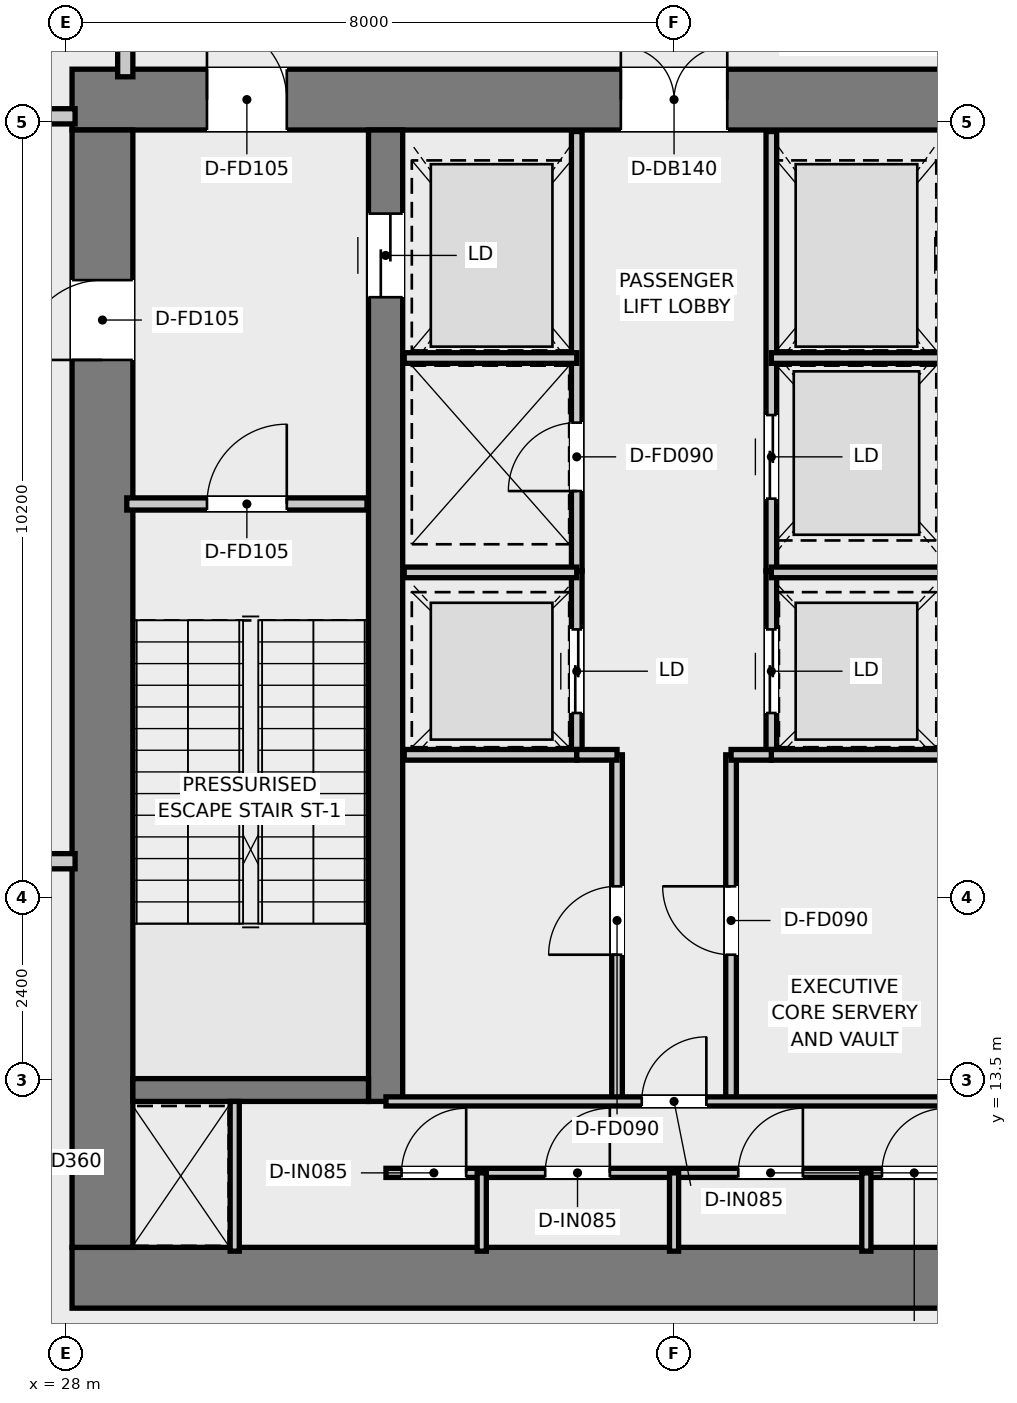
"""IFC4 building model, lengths in metres.
Left out: names, types, materials, properties, quantities, classifications, styles, units other than length and angle.
Written with IfcOpenShell. Run it as: python <this file> out.ifc"""

import sys

from ifc_helpers import new_model, si_unit, direction, frame, frame_2d, origin, place, context, subcontext, project, spatial, rectangle, extrude, element, fill, save


model = new_model("IFC4")
c1 = context("Model", 3, precision=1e-05, world=origin(), true_north=direction((0.0, 1.0)))
c2 = subcontext(c1, "Body", "Model", "MODEL_VIEW")
j1 = project(units=[si_unit("LENGTHUNIT", "METRE"), si_unit("PLANEANGLEUNIT", "RADIAN")], contexts=[c1])
p1 = place(None, origin())
s1 = spatial("IfcSite", under=j1, at=p1, CompositionType="ELEMENT")
p2 = place(p1, origin())
s2 = spatial("IfcBuilding", under=s1, at=p2, CompositionType="ELEMENT")
p3 = place(p2, frame((0.0, 0.0, 318.75)))
s3 = spatial("IfcBuildingStorey", under=s2, at=p3, CompositionType="ELEMENT", Elevation=318.75)
p4 = place(p3, frame((28.08, 10.9, 0.0), z_axis=(0.0, 0.0, 1.0), x_axis=(1.0, 0.0, 0.0)))
e1 = element("IfcWall", 1, at=p4, inside=s3, PredefinedType="SHEAR", context=c2, shape_type="SweptSolid", body=[
    extrude(rectangle(XDim=15.84, YDim=0.8, at=frame_2d((7.92, 0.0))), origin(), (0.0, 0.0, 1.0), 5.0),
])
p5 = place(p3, frame((28.08, 26.4, 0.0), z_axis=(0.0, 0.0, 1.0), x_axis=(1.0, 0.0, 0.0)))
e2 = element("IfcWall", 2, at=p5, inside=s3, PredefinedType="SHEAR", context=c2, shape_type="SweptSolid", body=[
    extrude(rectangle(XDim=15.84, YDim=0.8, at=frame_2d((7.92, 0.0))), origin(), (0.0, 0.0, 1.0), 5.0),
])
p6 = place(p5, frame((7.22, 0.0, 0.0)))
e3 = element("IfcOpeningElement", 3, at=p6, cuts=e2, PredefinedType="OPENING", context=c2, shape_type="SweptSolid", body=[
    extrude(rectangle(XDim=1.4, YDim=2.2, at=frame_2d((0.7, 1.1))), frame((0.0, 0.41, 0.0), z_axis=(0.0, -1.0, 0.0), x_axis=(1.0, 0.0, 0.0)), (0.0, 0.0, 1.0), 0.82),
])
p7 = place(p5, frame((1.775, 0.0, 0.0)))
e4 = element("IfcOpeningElement", 4, at=p7, cuts=e2, PredefinedType="OPENING", context=c2, shape_type="SweptSolid", body=[
    extrude(rectangle(XDim=1.05, YDim=2.1, at=frame_2d((0.525, 1.05))), frame((0.0, 0.41, 0.0), z_axis=(0.0, -1.0, 0.0), x_axis=(1.0, 0.0, 0.0)), (0.0, 0.0, 1.0), 0.82),
])
p8 = place(p5, frame((13.015, 0.0, 0.0)))
e5 = element("IfcOpeningElement", 5, at=p8, cuts=e2, PredefinedType="OPENING", context=c2, shape_type="SweptSolid", body=[
    extrude(rectangle(XDim=1.05, YDim=2.1, at=frame_2d((0.525, 1.05))), frame((0.0, 0.41, 0.0), z_axis=(0.0, -1.0, 0.0), x_axis=(1.0, 0.0, 0.0)), (0.0, 0.0, 1.0), 0.82),
])
p9 = place(p3, frame((28.48, 11.3, 0.0), z_axis=(0.0, 0.0, 1.0), x_axis=(0.0, 1.0, 0.0)))
e6 = element("IfcWall", 6, at=p9, inside=s3, PredefinedType="SHEAR", context=c2, shape_type="SweptSolid", body=[
    extrude(rectangle(XDim=14.7, YDim=0.8, at=frame_2d((7.35, 0.0))), origin(), (0.0, 0.0, 1.0), 5.0),
])
p10 = place(p9, frame((11.675, 0.0, 0.0)))
e7 = element("IfcOpeningElement", 7, at=p10, cuts=e6, PredefinedType="OPENING", context=c2, shape_type="SweptSolid", body=[
    extrude(rectangle(XDim=1.05, YDim=2.1, at=frame_2d((0.525, 1.05))), frame((0.0, 0.41, 0.0), z_axis=(0.0, -1.0, 0.0), x_axis=(1.0, 0.0, 0.0)), (0.0, 0.0, 1.0), 0.82),
])
p11 = place(p3, frame((32.205, 13.22, 0.0), z_axis=(0.0, 0.0, 1.0), x_axis=(0.0, 1.0, 0.0)))
e8 = element("IfcWall", 8, at=p11, inside=s3, PredefinedType="SHEAR", context=c2, shape_type="SweptSolid", body=[
    extrude(rectangle(XDim=12.78, YDim=0.45, at=frame_2d((6.39, 0.0))), origin(), (0.0, 0.0, 1.0), 5.0),
])
p12 = place(p11, frame((10.58, 0.0, 0.0)))
e9 = element("IfcOpeningElement", 9, at=p12, cuts=e8, PredefinedType="OPENING", context=c2, shape_type="SweptSolid", body=[
    extrude(rectangle(XDim=1.1, YDim=2.15, at=frame_2d((0.55, 1.075))), frame((0.0, 0.235, 0.0), z_axis=(0.0, -1.0, 0.0), x_axis=(1.0, 0.0, 0.0)), (0.0, 0.0, 1.0), 0.47),
])
p13 = place(p3, frame((28.88, 13.37, 0.0), z_axis=(0.0, 0.0, 1.0), x_axis=(1.0, 0.0, 0.0)))
e10 = element("IfcWall", 10, at=p13, inside=s3, PredefinedType="SHEAR", context=c2, shape_type="SweptSolid", body=[
    extrude(rectangle(XDim=3.1, YDim=0.3, at=frame_2d((1.55, 0.0))), origin(), (0.0, 0.0, 1.0), 5.0),
])
p14 = place(p3, frame((28.8, 21.08, 0.0), z_axis=(0.0, 0.0, 1.0), x_axis=(1.0, 0.0, 0.0)))
e11 = element("IfcWall", 11, at=p14, inside=s3, PredefinedType="PARTITIONING", context=c2, shape_type="SweptSolid", body=[
    extrude(rectangle(XDim=3.16, YDim=0.16, at=frame_2d((1.58, 0.0))), origin(), (0.0, 0.0, 1.0), 4.72),
])
p15 = place(p14, frame((1.055, 0.0, 0.0)))
e12 = element("IfcOpeningElement", 12, at=p15, cuts=e11, PredefinedType="OPENING", context=c2, shape_type="SweptSolid", body=[
    extrude(rectangle(XDim=1.05, YDim=2.1, at=frame_2d((0.525, 1.05))), frame((0.0, 0.09, 0.0), z_axis=(0.0, -1.0, 0.0), x_axis=(1.0, 0.0, 0.0)), (0.0, 0.0, 1.0), 0.18),
])
p16 = place(p3, frame((34.72, 20.2, 0.0), z_axis=(0.0, 0.0, 1.0), x_axis=(0.0, 1.0, 0.0)))
e13 = element("IfcWall", 13, at=p16, inside=s3, PredefinedType="PARTITIONING", context=c2, shape_type="SweptSolid", body=[
    extrude(rectangle(XDim=5.78, YDim=0.14, at=frame_2d((2.89, 0.0))), origin(), (0.0, 0.0, 1.0), 3.87),
])
p17 = place(p16, frame((1.05, 0.0, 0.0)))
e14 = element("IfcOpeningElement", 14, at=p17, cuts=e13, PredefinedType="OPENING", context=c2, shape_type="SweptSolid", body=[
    extrude(rectangle(XDim=0.9, YDim=2.1, at=frame_2d((0.45, 1.05))), frame((0.0, 0.08, 0.0), z_axis=(0.0, -1.0, 0.0), x_axis=(1.0, 0.0, 0.0)), (0.0, 0.0, 1.0), 0.16),
])
p18 = place(p3, frame((37.28, 20.2, 0.0), z_axis=(0.0, 0.0, 1.0), x_axis=(0.0, 1.0, 0.0)))
e15 = element("IfcWall", 15, at=p18, inside=s3, PredefinedType="PARTITIONING", context=c2, shape_type="SweptSolid", body=[
    extrude(rectangle(XDim=5.78, YDim=0.14, at=frame_2d((2.89, 0.0))), origin(), (0.0, 0.0, 1.0), 3.87),
])
p19 = place(p18, frame((0.95, 0.0, 0.0)))
e16 = element("IfcOpeningElement", 16, at=p19, cuts=e15, PredefinedType="OPENING", context=c2, shape_type="SweptSolid", body=[
    extrude(rectangle(XDim=1.1, YDim=2.15, at=frame_2d((0.55, 1.075))), frame((0.0, 0.08, 0.0), z_axis=(0.0, -1.0, 0.0), x_axis=(1.0, 0.0, 0.0)), (0.0, 0.0, 1.0), 0.16),
])
for number, where, z_axis, x_axis in (
    (17, (32.45, 23.0, 0.0), (0.0, 0.0, 1.0), (1.0, 0.0, 0.0)),
    (18, (37.28, 23.0, 0.0), (0.0, 0.0, 1.0), (1.0, 0.0, 0.0)),
):
    element("IfcWall", number, at=place(p3, frame(where, z_axis=z_axis, x_axis=x_axis)), inside=s3, PredefinedType="PARTITIONING", context=c2, shape_type="SweptSolid", body=[
        extrude(rectangle(XDim=2.27, YDim=0.14, at=frame_2d((1.135, 0.0))), origin(), (0.0, 0.0, 1.0), 3.87),
    ])
p20 = place(p3, frame((34.72, 17.78, 0.0), z_axis=(0.0, 0.0, 1.0), x_axis=(0.0, 1.0, 0.0)))
e19 = element("IfcWall", 19, at=p20, inside=s3, PredefinedType="PARTITIONING", context=c2, shape_type="SweptSolid", body=[
    extrude(rectangle(XDim=2.42, YDim=0.14, at=frame_2d((1.21, 0.0))), origin(), (0.0, 0.0, 1.0), 4.72),
])
p21 = place(p20, frame((0.55, 0.0, 0.0)))
e20 = element("IfcOpeningElement", 20, at=p21, cuts=e19, PredefinedType="OPENING", context=c2, shape_type="SweptSolid", body=[
    extrude(rectangle(XDim=1.1, YDim=2.15, at=frame_2d((0.55, 1.075))), frame((0.0, 0.08, 0.0), z_axis=(0.0, -1.0, 0.0), x_axis=(1.0, 0.0, 0.0)), (0.0, 0.0, 1.0), 0.16),
])
p22 = place(p3, frame((37.28, 17.78, 0.0), z_axis=(0.0, 0.0, 1.0), x_axis=(0.0, 1.0, 0.0)))
e21 = element("IfcWall", 21, at=p22, inside=s3, PredefinedType="PARTITIONING", context=c2, shape_type="SweptSolid", body=[
    extrude(rectangle(XDim=2.42, YDim=0.14, at=frame_2d((1.21, 0.0))), origin(), (0.0, 0.0, 1.0), 4.72),
])
p23 = place(p22, frame((0.55, 0.0, 0.0)))
e22 = element("IfcOpeningElement", 22, at=p23, cuts=e21, PredefinedType="OPENING", context=c2, shape_type="SweptSolid", body=[
    extrude(rectangle(XDim=1.1, YDim=2.15, at=frame_2d((0.55, 1.075))), frame((0.0, 0.08, 0.0), z_axis=(0.0, -1.0, 0.0), x_axis=(1.0, 0.0, 0.0)), (0.0, 0.0, 1.0), 0.16),
])
for number, where, z_axis, x_axis in (
    (23, (32.45, 17.78, 0.0), (0.0, 0.0, 1.0), (1.0, 0.0, 0.0)),
    (24, (32.45, 20.18, 0.0), (0.0, 0.0, 1.0), (1.0, 0.0, 0.0)),
    (25, (37.28, 17.78, 0.0), (0.0, 0.0, 1.0), (1.0, 0.0, 0.0)),
    (26, (37.28, 20.18, 0.0), (0.0, 0.0, 1.0), (1.0, 0.0, 0.0)),
):
    element("IfcWall", number, at=place(p3, frame(where, z_axis=z_axis, x_axis=x_axis)), inside=s3, PredefinedType="PARTITIONING", context=c2, shape_type="SweptSolid", body=[
        extrude(rectangle(XDim=2.27, YDim=0.14, at=frame_2d((1.135, 0.0))), origin(), (0.0, 0.0, 1.0), 4.72),
    ])
p24 = place(p3, frame((35.25, 13.22, 0.0), z_axis=(0.0, 0.0, 1.0), x_axis=(0.0, 1.0, 0.0)))
e27 = element("IfcWall", 27, at=p24, inside=s3, PredefinedType="PARTITIONING", context=c2, shape_type="SweptSolid", body=[
    extrude(rectangle(XDim=4.56, YDim=0.14, at=frame_2d((2.28, 0.0))), origin(), (0.0, 0.0, 1.0), 4.72),
])
p25 = place(p24, frame((1.93, 0.0, 0.0)))
e28 = element("IfcOpeningElement", 28, at=p25, cuts=e27, PredefinedType="OPENING", context=c2, shape_type="SweptSolid", body=[
    extrude(rectangle(XDim=0.9, YDim=2.1, at=frame_2d((0.45, 1.05))), frame((0.0, 0.08, 0.0), z_axis=(0.0, -1.0, 0.0), x_axis=(1.0, 0.0, 0.0)), (0.0, 0.0, 1.0), 0.16),
])
p26 = place(p3, frame((34.72, 17.78, 0.0), z_axis=(0.0, 0.0, 1.0), x_axis=(1.0, 0.0, 0.0)))
e29 = element("IfcWall", 29, at=p26, inside=s3, PredefinedType="PARTITIONING", context=c2, shape_type="SweptSolid", body=[
    extrude(rectangle(XDim=0.53, YDim=0.14, at=frame_2d((0.265, 0.0))), origin(), (0.0, 0.0, 1.0), 4.72),
])
p27 = place(p3, frame((36.75, 13.22, 0.0), z_axis=(0.0, 0.0, 1.0), x_axis=(0.0, 1.0, 0.0)))
e30 = element("IfcWall", 30, at=p27, inside=s3, PredefinedType="PARTITIONING", context=c2, shape_type="SweptSolid", body=[
    extrude(rectangle(XDim=4.56, YDim=0.14, at=frame_2d((2.28, 0.0))), origin(), (0.0, 0.0, 1.0), 4.72),
])
p28 = place(p27, frame((1.93, 0.0, 0.0)))
e31 = element("IfcOpeningElement", 31, at=p28, cuts=e30, PredefinedType="OPENING", context=c2, shape_type="SweptSolid", body=[
    extrude(rectangle(XDim=0.9, YDim=2.1, at=frame_2d((0.45, 1.05))), frame((0.0, 0.08, 0.0), z_axis=(0.0, -1.0, 0.0), x_axis=(1.0, 0.0, 0.0)), (0.0, 0.0, 1.0), 0.16),
])
p29 = place(p3, frame((36.75, 17.78, 0.0), z_axis=(0.0, 0.0, 1.0), x_axis=(1.0, 0.0, 0.0)))
e32 = element("IfcWall", 32, at=p29, inside=s3, PredefinedType="PARTITIONING", context=c2, shape_type="SweptSolid", body=[
    extrude(rectangle(XDim=0.53, YDim=0.14, at=frame_2d((0.265, 0.0))), origin(), (0.0, 0.0, 1.0), 4.72),
])
p30 = place(p3, frame((30.22, 11.25, 0.0), z_axis=(0.0, 0.0, 1.0), x_axis=(0.0, 1.0, 0.0)))
e33 = element("IfcWall", 33, at=p30, inside=s3, PredefinedType="PARTITIONING", context=c2, shape_type="SweptSolid", body=[
    extrude(rectangle(XDim=1.97, YDim=0.12, at=frame_2d((0.985, 0.0))), origin(), (0.0, 0.0, 1.0), 4.72),
])
p31 = place(p3, frame((32.21, 13.22, 0.0), z_axis=(0.0, 0.0, 1.0), x_axis=(1.0, 0.0, 0.0)))
e34 = element("IfcWall", 34, at=p31, inside=s3, PredefinedType="PARTITIONING", context=c2, shape_type="SweptSolid", body=[
    extrude(rectangle(XDim=7.58, YDim=0.12, at=frame_2d((3.79, 0.0))), origin(), (0.0, 0.0, 1.0), 4.72),
])
p32 = place(p31, frame((3.365, 0.0, 0.0)))
e35 = element("IfcOpeningElement", 35, at=p32, cuts=e34, PredefinedType="OPENING", context=c2, shape_type="SweptSolid", body=[
    extrude(rectangle(XDim=0.85, YDim=2.1, at=frame_2d((0.425, 1.05))), frame((0.0, 0.07, 0.0), z_axis=(0.0, -1.0, 0.0), x_axis=(1.0, 0.0, 0.0)), (0.0, 0.0, 1.0), 0.14),
])
p33 = place(p3, frame((32.21, 12.28, 0.0), z_axis=(0.0, 0.0, 1.0), x_axis=(1.0, 0.0, 0.0)))
e36 = element("IfcWall", 36, at=p33, inside=s3, PredefinedType="PARTITIONING", context=c2, shape_type="SweptSolid", body=[
    extrude(rectangle(XDim=7.58, YDim=0.12, at=frame_2d((3.79, 0.0))), origin(), (0.0, 0.0, 1.0), 4.72),
])
p34 = place(p33, frame((0.205, 0.0, 0.0)))
e37 = element("IfcOpeningElement", 37, at=p34, cuts=e36, PredefinedType="OPENING", context=c2, shape_type="SweptSolid", body=[
    extrude(rectangle(XDim=0.85, YDim=2.1, at=frame_2d((0.425, 1.05))), frame((0.0, 0.07, 0.0), z_axis=(0.0, -1.0, 0.0), x_axis=(1.0, 0.0, 0.0)), (0.0, 0.0, 1.0), 0.14),
])
p35 = place(p33, frame((2.095, 0.0, 0.0)))
e38 = element("IfcOpeningElement", 38, at=p35, cuts=e36, PredefinedType="OPENING", context=c2, shape_type="SweptSolid", body=[
    extrude(rectangle(XDim=0.85, YDim=2.1, at=frame_2d((0.425, 1.05))), frame((0.0, 0.07, 0.0), z_axis=(0.0, -1.0, 0.0), x_axis=(1.0, 0.0, 0.0)), (0.0, 0.0, 1.0), 0.14),
])
p36 = place(p33, frame((4.635, 0.0, 0.0)))
e39 = element("IfcOpeningElement", 39, at=p36, cuts=e36, PredefinedType="OPENING", context=c2, shape_type="SweptSolid", body=[
    extrude(rectangle(XDim=0.85, YDim=2.1, at=frame_2d((0.425, 1.05))), frame((0.0, 0.07, 0.0), z_axis=(0.0, -1.0, 0.0), x_axis=(1.0, 0.0, 0.0)), (0.0, 0.0, 1.0), 0.14),
])
p37 = place(p33, frame((6.525, 0.0, 0.0)))
e40 = element("IfcOpeningElement", 40, at=p37, cuts=e36, PredefinedType="OPENING", context=c2, shape_type="SweptSolid", body=[
    extrude(rectangle(XDim=0.85, YDim=2.1, at=frame_2d((0.425, 1.05))), frame((0.0, 0.07, 0.0), z_axis=(0.0, -1.0, 0.0), x_axis=(1.0, 0.0, 0.0)), (0.0, 0.0, 1.0), 0.14),
])
for number, where, z_axis, x_axis in (
    (41, (33.47, 11.25, 0.0), (0.0, 0.0, 1.0), (0.0, 1.0, 0.0)),
    (42, (36.0, 11.25, 0.0), (0.0, 0.0, 1.0), (0.0, 1.0, 0.0)),
    (43, (38.53, 11.25, 0.0), (0.0, 0.0, 1.0), (0.0, 1.0, 0.0)),
):
    element("IfcWall", number, at=place(p3, frame(where, z_axis=z_axis, x_axis=x_axis)), inside=s3, PredefinedType="PARTITIONING", context=c2, shape_type="SweptSolid", body=[
        extrude(rectangle(XDim=1.03, YDim=0.12, at=frame_2d((0.515, 0.0))), origin(), (0.0, 0.0, 1.0), 4.72),
    ])
p38 = place(p3, frame((28.78, 26.7, 0.0), z_axis=(0.0, 0.0, 1.0), x_axis=(0.0, 1.0, 0.0)))
e44 = element("IfcWall", 44, at=p38, inside=s3, PredefinedType="SOLIDWALL", context=c2, shape_type="SweptSolid", body=[
    extrude(rectangle(XDim=12.6, YDim=0.2, at=frame_2d((6.3, 0.0))), origin(), (0.0, 0.0, 1.0), 4.18),
])
p39 = place(p3, frame((22.05, 16.38, 0.0), z_axis=(0.0, 0.0, 1.0), x_axis=(1.0, 0.0, 0.0)))
e45 = element("IfcWall", 45, at=p39, inside=s3, PredefinedType="SOLIDWALL", context=c2, shape_type="SweptSolid", body=[
    extrude(rectangle(XDim=6.07, YDim=0.2, at=frame_2d((3.035, 0.0))), origin(), (0.0, 0.0, 1.0), 4.18),
])
p40 = place(p3, frame((24.58, 26.18, 0.0), z_axis=(0.0, 0.0, 1.0), x_axis=(1.0, 0.0, 0.0)))
e46 = element("IfcWall", 46, at=p40, inside=s3, PredefinedType="SOLIDWALL", context=c2, shape_type="SweptSolid", body=[
    extrude(rectangle(XDim=3.54, YDim=0.2, at=frame_2d((1.77, 0.0))), origin(), (0.0, 0.0, 1.0), 4.18),
])
p41 = place(p15, origin())
e47 = element("IfcDoor", 47, at=p41, inside=s3, OperationType="SINGLE_SWING_RIGHT", PredefinedType="DOOR", context=c2, shape_type="SweptSolid", body=[
    extrude(rectangle(XDim=1.05, YDim=2.1, at=frame_2d((0.525, 1.05))), frame((0.0, 0.025, 0.0), z_axis=(0.0, -1.0, 0.0), x_axis=(1.0, 0.0, 0.0)), (0.0, 0.0, 1.0), 0.05),
])
fill(e12, e47)
p42 = place(p6, origin())
e48 = element("IfcDoor", 48, at=p42, inside=s3, OperationType="DOUBLE_DOOR_SINGLE_SWING", PredefinedType="DOOR", context=c2, shape_type="SweptSolid", body=[
    extrude(rectangle(XDim=1.4, YDim=2.2, at=frame_2d((0.7, 1.1))), frame((0.0, 0.025, 0.0), z_axis=(0.0, -1.0, 0.0), x_axis=(1.0, 0.0, 0.0)), (0.0, 0.0, 1.0), 0.05),
])
fill(e3, e48)
p43 = place(p7, origin())
e49 = element("IfcDoor", 49, at=p43, inside=s3, OperationType="SINGLE_SWING_LEFT", PredefinedType="DOOR", context=c2, shape_type="SweptSolid", body=[
    extrude(rectangle(XDim=1.05, YDim=2.1, at=frame_2d((0.525, 1.05))), frame((0.0, 0.025, 0.0), z_axis=(0.0, -1.0, 0.0), x_axis=(1.0, 0.0, 0.0)), (0.0, 0.0, 1.0), 0.05),
])
fill(e4, e49)
p44 = place(p10, origin())
e50 = element("IfcDoor", 50, at=p44, inside=s3, OperationType="SINGLE_SWING_LEFT", PredefinedType="DOOR", context=c2, shape_type="SweptSolid", body=[
    extrude(rectangle(XDim=1.05, YDim=2.1, at=frame_2d((0.525, 1.05))), frame((0.0, 0.025, 0.0), z_axis=(0.0, -1.0, 0.0), x_axis=(1.0, 0.0, 0.0)), (0.0, 0.0, 1.0), 0.05),
])
fill(e7, e50)
p45 = place(p12, origin())
e51 = element("IfcDoor", 51, at=p45, inside=s3, OperationType="DOUBLE_DOOR_SLIDING", PredefinedType="DOOR", context=c2, shape_type="SweptSolid", body=[
    extrude(rectangle(XDim=1.1, YDim=2.15, at=frame_2d((0.55, 1.075))), frame((0.0, 0.025, 0.0), z_axis=(0.0, -1.0, 0.0), x_axis=(1.0, 0.0, 0.0)), (0.0, 0.0, 1.0), 0.05),
])
fill(e9, e51)
p46 = place(p17, origin())
e52 = element("IfcDoor", 52, at=p46, inside=s3, OperationType="SINGLE_SWING_LEFT", PredefinedType="DOOR", context=c2, shape_type="SweptSolid", body=[
    extrude(rectangle(XDim=0.9, YDim=2.1, at=frame_2d((0.45, 1.05))), frame((0.0, 0.025, 0.0), z_axis=(0.0, -1.0, 0.0), x_axis=(1.0, 0.0, 0.0)), (0.0, 0.0, 1.0), 0.05),
])
fill(e14, e52)
p47 = place(p19, origin())
e53 = element("IfcDoor", 53, at=p47, inside=s3, OperationType="DOUBLE_DOOR_SLIDING", PredefinedType="DOOR", context=c2, shape_type="SweptSolid", body=[
    extrude(rectangle(XDim=1.1, YDim=2.15, at=frame_2d((0.55, 1.075))), frame((0.0, 0.025, 0.0), z_axis=(0.0, -1.0, 0.0), x_axis=(1.0, 0.0, 0.0)), (0.0, 0.0, 1.0), 0.05),
])
fill(e16, e53)
p48 = place(p21, origin())
e54 = element("IfcDoor", 54, at=p48, inside=s3, OperationType="DOUBLE_DOOR_SLIDING", PredefinedType="DOOR", context=c2, shape_type="SweptSolid", body=[
    extrude(rectangle(XDim=1.1, YDim=2.15, at=frame_2d((0.55, 1.075))), frame((0.0, 0.025, 0.0), z_axis=(0.0, -1.0, 0.0), x_axis=(1.0, 0.0, 0.0)), (0.0, 0.0, 1.0), 0.05),
])
fill(e20, e54)
p49 = place(p23, origin())
e55 = element("IfcDoor", 55, at=p49, inside=s3, OperationType="DOUBLE_DOOR_SLIDING", PredefinedType="DOOR", context=c2, shape_type="SweptSolid", body=[
    extrude(rectangle(XDim=1.1, YDim=2.15, at=frame_2d((0.55, 1.075))), frame((0.0, 0.025, 0.0), z_axis=(0.0, -1.0, 0.0), x_axis=(1.0, 0.0, 0.0)), (0.0, 0.0, 1.0), 0.05),
])
fill(e22, e55)
p50 = place(p25, origin())
e56 = element("IfcDoor", 56, at=p50, inside=s3, OperationType="SINGLE_SWING_LEFT", PredefinedType="DOOR", context=c2, shape_type="SweptSolid", body=[
    extrude(rectangle(XDim=0.9, YDim=2.1, at=frame_2d((0.45, 1.05))), frame((0.0, 0.025, 0.0), z_axis=(0.0, -1.0, 0.0), x_axis=(1.0, 0.0, 0.0)), (0.0, 0.0, 1.0), 0.05),
])
fill(e28, e56)
p51 = place(p28, origin())
e57 = element("IfcDoor", 57, at=p51, inside=s3, OperationType="SINGLE_SWING_RIGHT", PredefinedType="DOOR", context=c2, shape_type="SweptSolid", body=[
    extrude(rectangle(XDim=0.9, YDim=2.1, at=frame_2d((0.45, 1.05))), frame((0.0, 0.025, 0.0), z_axis=(0.0, -1.0, 0.0), x_axis=(1.0, 0.0, 0.0)), (0.0, 0.0, 1.0), 0.05),
])
fill(e31, e57)
p52 = place(p32, origin())
e58 = element("IfcDoor", 58, at=p52, inside=s3, OperationType="SINGLE_SWING_RIGHT", PredefinedType="DOOR", context=c2, shape_type="SweptSolid", body=[
    extrude(rectangle(XDim=0.85, YDim=2.1, at=frame_2d((0.425, 1.05))), frame((0.0, 0.025, 0.0), z_axis=(0.0, -1.0, 0.0), x_axis=(1.0, 0.0, 0.0)), (0.0, 0.0, 1.0), 0.05),
])
fill(e35, e58)
p53 = place(p34, origin())
e59 = element("IfcDoor", 59, at=p53, inside=s3, OperationType="SINGLE_SWING_RIGHT", PredefinedType="DOOR", context=c2, shape_type="SweptSolid", body=[
    extrude(rectangle(XDim=0.85, YDim=2.1, at=frame_2d((0.425, 1.05))), frame((0.0, 0.025, 0.0), z_axis=(0.0, -1.0, 0.0), x_axis=(1.0, 0.0, 0.0)), (0.0, 0.0, 1.0), 0.05),
])
fill(e37, e59)
p54 = place(p35, origin())
e60 = element("IfcDoor", 60, at=p54, inside=s3, OperationType="SINGLE_SWING_RIGHT", PredefinedType="DOOR", context=c2, shape_type="SweptSolid", body=[
    extrude(rectangle(XDim=0.85, YDim=2.1, at=frame_2d((0.425, 1.05))), frame((0.0, 0.025, 0.0), z_axis=(0.0, -1.0, 0.0), x_axis=(1.0, 0.0, 0.0)), (0.0, 0.0, 1.0), 0.05),
])
fill(e38, e60)
p55 = place(p36, origin())
e61 = element("IfcDoor", 61, at=p55, inside=s3, OperationType="SINGLE_SWING_RIGHT", PredefinedType="DOOR", context=c2, shape_type="SweptSolid", body=[
    extrude(rectangle(XDim=0.85, YDim=2.1, at=frame_2d((0.425, 1.05))), frame((0.0, 0.025, 0.0), z_axis=(0.0, -1.0, 0.0), x_axis=(1.0, 0.0, 0.0)), (0.0, 0.0, 1.0), 0.05),
])
fill(e39, e61)
p56 = place(p37, origin())
e62 = element("IfcDoor", 62, at=p56, inside=s3, OperationType="SINGLE_SWING_RIGHT", PredefinedType="DOOR", context=c2, shape_type="SweptSolid", body=[
    extrude(rectangle(XDim=0.85, YDim=2.1, at=frame_2d((0.425, 1.05))), frame((0.0, 0.025, 0.0), z_axis=(0.0, -1.0, 0.0), x_axis=(1.0, 0.0, 0.0)), (0.0, 0.0, 1.0), 0.05),
])
fill(e40, e62)
save(model, sys.argv[1])
